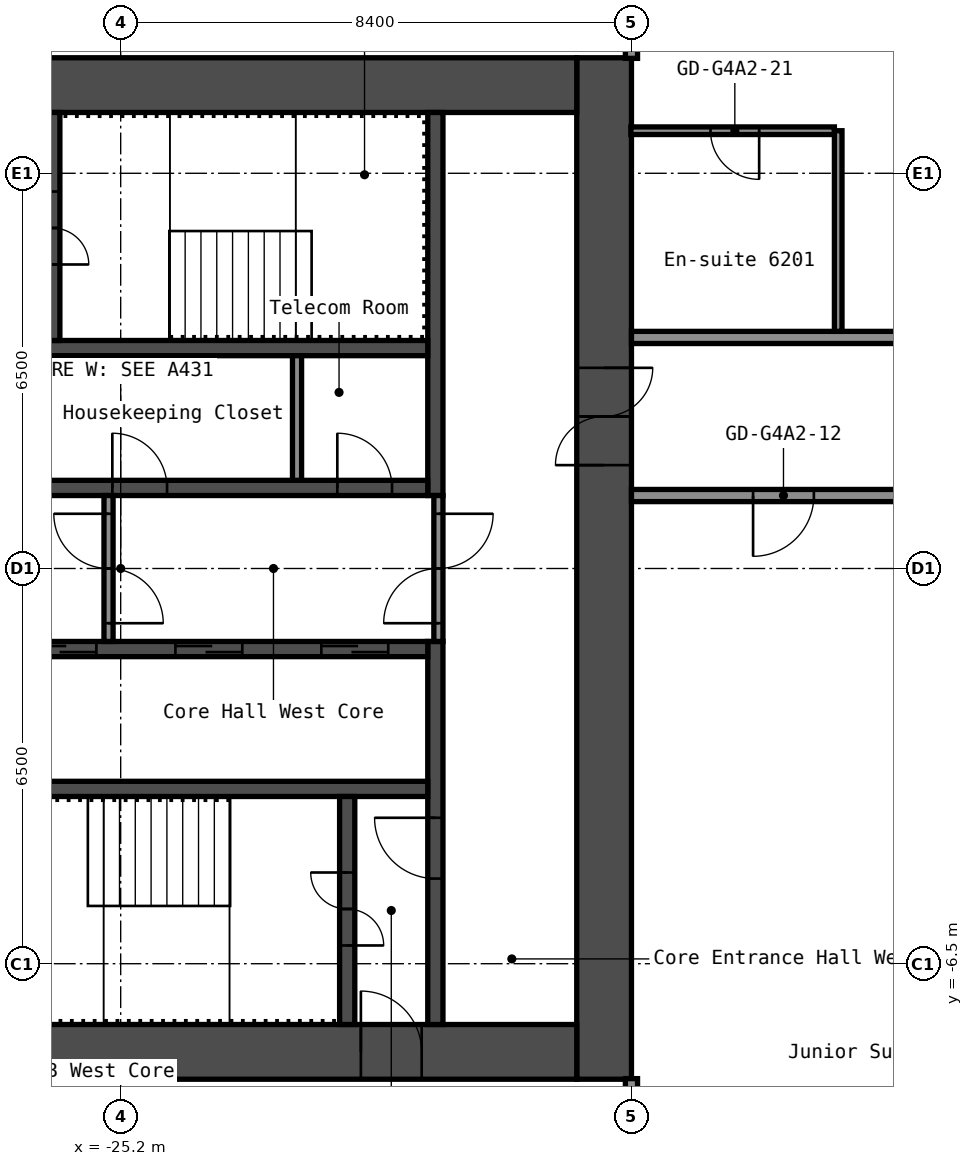
"""IFC4 building model, lengths in metres.
Left out: names, types, materials, properties, quantities, classifications, styles, units other than length and angle.
Written with IfcOpenShell. Run it as: python <this file> out.ifc"""

import sys

from ifc_helpers import new_model, si_unit, direction, frame, frame_2d, origin, place, context, subcontext, project, spatial, rectangle, extrude, element, fill, save


model = new_model("IFC4")
c1 = context("Model", 3, precision=1e-05, world=origin(), true_north=direction((0.0, 1.0)))
c2 = subcontext(c1, "Body", "Model", "MODEL_VIEW")
j1 = project(units=[si_unit("LENGTHUNIT", "METRE"), si_unit("PLANEANGLEUNIT", "RADIAN")], contexts=[c1])
p1 = place(None, origin())
s1 = spatial("IfcSite", under=j1, at=p1, CompositionType="ELEMENT")
p2 = place(p1, origin())
s2 = spatial("IfcBuilding", under=s1, at=p2, CompositionType="ELEMENT")
p3 = place(p2, frame((0.0, 0.0, 218.6)))
s3 = spatial("IfcBuildingStorey", under=s2, at=p3, CompositionType="ELEMENT", Elevation=218.6)
p4 = place(p3, frame((-17.25, -8.4, 0.0), z_axis=(0.0, 0.0, 1.0), x_axis=(0.0, 1.0, 0.0)))
e1 = element("IfcWall", 1, at=p4, inside=s3, PredefinedType="SHEAR", context=c2, shape_type="SweptSolid", body=[
    extrude(rectangle(XDim=16.8, YDim=0.9, at=frame_2d((8.4, 0.0))), origin(), (0.0, 0.0, 1.0), 2.75),
])
p5 = place(p4, frame((10.1, 0.0, 0.0)))
e2 = element("IfcOpeningElement", 2, at=p5, cuts=e1, PredefinedType="OPENING", context=c2, shape_type="SweptSolid", body=[
    extrude(rectangle(XDim=1.6, YDim=2.1, at=frame_2d((0.8, 1.05))), frame((0.0, 0.46, 0.0), z_axis=(0.0, -1.0, 0.0), x_axis=(1.0, 0.0, 0.0)), (0.0, 0.0, 1.0), 0.92),
])
p6 = place(p3, frame((-32.7, 7.95, 0.0), z_axis=(0.0, 0.0, 1.0), x_axis=(1.0, 0.0, 0.0)))
e3 = element("IfcWall", 3, at=p6, inside=s3, PredefinedType="SHEAR", context=c2, shape_type="SweptSolid", body=[
    extrude(rectangle(XDim=15.0, YDim=0.9, at=frame_2d((7.5, 0.0))), origin(), (0.0, 0.0, 1.0), 2.75),
])
p7 = place(p6, frame((3.4, 0.0, 0.0)))
e4 = element("IfcOpeningElement", 4, at=p7, cuts=e3, PredefinedType="OPENING", context=c2, shape_type="SweptSolid", body=[
    extrude(rectangle(XDim=1.2, YDim=2.1, at=frame_2d((0.6, 1.05))), frame((0.0, 0.46, 0.0), z_axis=(0.0, -1.0, 0.0), x_axis=(1.0, 0.0, 0.0)), (0.0, 0.0, 1.0), 0.92),
])
p8 = place(p6, frame((0.75, 0.0, 0.0)))
e5 = element("IfcOpeningElement", 5, at=p8, cuts=e3, PredefinedType="OPENING", context=c2, shape_type="SweptSolid", body=[
    extrude(rectangle(XDim=0.9, YDim=2.1, at=frame_2d((0.45, 1.05))), frame((0.0, 0.46, 0.0), z_axis=(0.0, -1.0, 0.0), x_axis=(1.0, 0.0, 0.0)), (0.0, 0.0, 1.0), 0.92),
])
p9 = place(p3, frame((-32.7, -7.95, 0.0), z_axis=(0.0, 0.0, 1.0), x_axis=(1.0, 0.0, 0.0)))
e6 = element("IfcWall", 6, at=p9, inside=s3, PredefinedType="SHEAR", context=c2, shape_type="SweptSolid", body=[
    extrude(rectangle(XDim=15.0, YDim=0.9, at=frame_2d((7.5, 0.0))), origin(), (0.0, 0.0, 1.0), 2.75),
])
p10 = place(p9, frame((11.45, 0.0, 0.0)))
e7 = element("IfcOpeningElement", 7, at=p10, cuts=e6, PredefinedType="OPENING", context=c2, shape_type="SweptSolid", body=[
    extrude(rectangle(XDim=1.0, YDim=2.1, at=frame_2d((0.5, 1.05))), frame((0.0, 0.46, 0.0), z_axis=(0.0, -1.0, 0.0), x_axis=(1.0, 0.0, 0.0)), (0.0, 0.0, 1.0), 0.92),
])
p11 = place(p3, frame((-20.025, 1.2, 0.0), z_axis=(0.0, 0.0, 1.0), x_axis=(0.0, 1.0, 0.0)))
e8 = element("IfcWall", 8, at=p11, inside=s3, PredefinedType="SHEAR", context=c2, shape_type="SweptSolid", body=[
    extrude(rectangle(XDim=6.3, YDim=0.25, at=frame_2d((3.15, 0.0))), origin(), (0.0, 0.0, 1.0), 2.75),
])
p12 = place(p3, frame((-20.025, -7.5, 0.0), z_axis=(0.0, 0.0, 1.0), x_axis=(0.0, 1.0, 0.0)))
e9 = element("IfcWall", 9, at=p12, inside=s3, PredefinedType="SHEAR", context=c2, shape_type="SweptSolid", body=[
    extrude(rectangle(XDim=6.3, YDim=0.25, at=frame_2d((3.15, 0.0))), origin(), (0.0, 0.0, 1.0), 2.75),
])
p13 = place(p12, frame((2.4, 0.0, 0.0)))
e10 = element("IfcOpeningElement", 10, at=p13, cuts=e9, PredefinedType="OPENING", context=c2, shape_type="SweptSolid", body=[
    extrude(rectangle(XDim=1.0, YDim=2.1, at=frame_2d((0.5, 1.05))), frame((0.0, 0.135, 0.0), z_axis=(0.0, -1.0, 0.0), x_axis=(1.0, 0.0, 0.0)), (0.0, 0.0, 1.0), 0.27),
])
p14 = place(p3, frame((-27.65, 1.325, 0.0), z_axis=(0.0, 0.0, 1.0), x_axis=(1.0, 0.0, 0.0)))
e11 = element("IfcWall", 11, at=p14, inside=s3, PredefinedType="SHEAR", context=c2, shape_type="SweptSolid", body=[
    extrude(rectangle(XDim=7.5, YDim=0.25, at=frame_2d((3.75, 0.0))), origin(), (0.0, 0.0, 1.0), 2.75),
])
p15 = place(p14, frame((6.012, 0.0, 0.0)))
e12 = element("IfcOpeningElement", 12, at=p15, cuts=e11, PredefinedType="OPENING", context=c2, shape_type="SweptSolid", body=[
    extrude(rectangle(XDim=0.9, YDim=2.1, at=frame_2d((0.45, 1.05))), frame((0.0, 0.135, 0.0), z_axis=(0.0, -1.0, 0.0), x_axis=(1.0, 0.0, 0.0)), (0.0, 0.0, 1.0), 0.27),
])
p16 = place(p14, frame((2.312, 0.0, 0.0)))
e13 = element("IfcOpeningElement", 13, at=p16, cuts=e11, PredefinedType="OPENING", context=c2, shape_type="SweptSolid", body=[
    extrude(rectangle(XDim=0.9, YDim=2.1, at=frame_2d((0.45, 1.05))), frame((0.0, 0.135, 0.0), z_axis=(0.0, -1.0, 0.0), x_axis=(1.0, 0.0, 0.0)), (0.0, 0.0, 1.0), 0.27),
])
p17 = place(p3, frame((-27.65, 3.625, 0.0), z_axis=(0.0, 0.0, 1.0), x_axis=(1.0, 0.0, 0.0)))
e14 = element("IfcWall", 14, at=p17, inside=s3, PredefinedType="SHEAR", context=c2, shape_type="SweptSolid", body=[
    extrude(rectangle(XDim=7.5, YDim=0.25, at=frame_2d((3.75, 0.0))), origin(), (0.0, 0.0, 1.0), 2.75),
])
p18 = place(p3, frame((-26.325, 3.75, 0.0), z_axis=(0.0, 0.0, 1.0), x_axis=(0.0, 1.0, 0.0)))
e15 = element("IfcWall", 15, at=p18, inside=s3, PredefinedType="SHEAR", context=c2, shape_type="SweptSolid", body=[
    extrude(rectangle(XDim=3.75, YDim=0.25, at=frame_2d((1.875, 0.0))), origin(), (0.0, 0.0, 1.0), 2.75),
])
p19 = place(p18, frame((1.25, 0.0, 0.0)))
e16 = element("IfcOpeningElement", 16, at=p19, cuts=e15, PredefinedType="OPENING", context=c2, shape_type="SweptSolid", body=[
    extrude(rectangle(XDim=1.2, YDim=2.1, at=frame_2d((0.6, 1.05))), frame((0.0, 0.135, 0.0), z_axis=(0.0, -1.0, 0.0), x_axis=(1.0, 0.0, 0.0)), (0.0, 0.0, 1.0), 0.27),
])
p20 = place(p3, frame((-27.65, -1.325, 0.0), z_axis=(0.0, 0.0, 1.0), x_axis=(1.0, 0.0, 0.0)))
e17 = element("IfcWall", 17, at=p20, inside=s3, PredefinedType="SHEAR", context=c2, shape_type="SweptSolid", body=[
    extrude(rectangle(XDim=7.5, YDim=0.25, at=frame_2d((3.75, 0.0))), origin(), (0.0, 0.0, 1.0), 2.75),
])
p21 = place(p20, frame((5.75, 0.0, 0.0)))
e18 = element("IfcOpeningElement", 18, at=p21, cuts=e17, PredefinedType="OPENING", context=c2, shape_type="SweptSolid", body=[
    extrude(rectangle(XDim=1.1, YDim=2.1, at=frame_2d((0.55, 1.05))), frame((0.0, 0.135, 0.0), z_axis=(0.0, -1.0, 0.0), x_axis=(1.0, 0.0, 0.0)), (0.0, 0.0, 1.0), 0.27),
])
p22 = place(p20, frame((3.35, 0.0, 0.0)))
e19 = element("IfcOpeningElement", 19, at=p22, cuts=e17, PredefinedType="OPENING", context=c2, shape_type="SweptSolid", body=[
    extrude(rectangle(XDim=1.1, YDim=2.1, at=frame_2d((0.55, 1.05))), frame((0.0, 0.135, 0.0), z_axis=(0.0, -1.0, 0.0), x_axis=(1.0, 0.0, 0.0)), (0.0, 0.0, 1.0), 0.27),
])
p23 = place(p20, frame((0.95, 0.0, 0.0)))
e20 = element("IfcOpeningElement", 20, at=p23, cuts=e17, PredefinedType="OPENING", context=c2, shape_type="SweptSolid", body=[
    extrude(rectangle(XDim=1.1, YDim=2.1, at=frame_2d((0.55, 1.05))), frame((0.0, 0.135, 0.0), z_axis=(0.0, -1.0, 0.0), x_axis=(1.0, 0.0, 0.0)), (0.0, 0.0, 1.0), 0.27),
])
p24 = place(p3, frame((-27.65, -3.625, 0.0), z_axis=(0.0, 0.0, 1.0), x_axis=(1.0, 0.0, 0.0)))
e21 = element("IfcWall", 21, at=p24, inside=s3, PredefinedType="SHEAR", context=c2, shape_type="SweptSolid", body=[
    extrude(rectangle(XDim=7.5, YDim=0.25, at=frame_2d((3.75, 0.0))), origin(), (0.0, 0.0, 1.0), 2.75),
])
p25 = place(p3, frame((-21.475, -7.5, 0.0), z_axis=(0.0, 0.0, 1.0), x_axis=(0.0, 1.0, 0.0)))
e22 = element("IfcWall", 22, at=p25, inside=s3, PredefinedType="SHEAR", context=c2, shape_type="SweptSolid", body=[
    extrude(rectangle(XDim=3.75, YDim=0.25, at=frame_2d((1.875, 0.0))), origin(), (0.0, 0.0, 1.0), 2.75),
])
p26 = place(p25, frame((1.3, 0.0, 0.0)))
e23 = element("IfcOpeningElement", 23, at=p26, cuts=e22, PredefinedType="OPENING", context=c2, shape_type="SweptSolid", body=[
    extrude(rectangle(XDim=1.2, YDim=2.1, at=frame_2d((0.6, 1.05))), frame((0.0, 0.135, 0.0), z_axis=(0.0, -1.0, 0.0), x_axis=(1.0, 0.0, 0.0)), (0.0, 0.0, 1.0), 0.27),
])
p27 = place(p3, frame((-19.975, -1.2, 0.0), z_axis=(0.0, 0.0, 1.0), x_axis=(0.0, 1.0, 0.0)))
e24 = element("IfcWall", 24, at=p27, inside=s3, PredefinedType="PARTITIONING", context=c2, shape_type="SweptSolid", body=[
    extrude(rectangle(XDim=2.4, YDim=0.15, at=frame_2d((1.2, 0.0))), origin(), (0.0, 0.0, 1.0), 2.75),
])
p28 = place(p27, frame((0.3, 0.0, 0.0)))
e25 = element("IfcOpeningElement", 25, at=p28, cuts=e24, PredefinedType="OPENING", context=c2, shape_type="SweptSolid", body=[
    extrude(rectangle(XDim=1.8, YDim=2.1, at=frame_2d((0.9, 1.05))), frame((0.0, 0.085, 0.0), z_axis=(0.0, -1.0, 0.0), x_axis=(1.0, 0.0, 0.0)), (0.0, 0.0, 1.0), 0.17),
])
p29 = place(p3, frame((-25.4, -1.2, 0.0), z_axis=(0.0, 0.0, 1.0), x_axis=(0.0, 1.0, 0.0)))
e26 = element("IfcWall", 26, at=p29, inside=s3, PredefinedType="PARTITIONING", context=c2, shape_type="SweptSolid", body=[
    extrude(rectangle(XDim=2.4, YDim=0.15, at=frame_2d((1.2, 0.0))), origin(), (0.0, 0.0, 1.0), 2.75),
])
p30 = place(p29, frame((0.3, 0.0, 0.0)))
e27 = element("IfcOpeningElement", 27, at=p30, cuts=e26, PredefinedType="OPENING", context=c2, shape_type="SweptSolid", body=[
    extrude(rectangle(XDim=1.8, YDim=2.1, at=frame_2d((0.9, 1.05))), frame((0.0, 0.085, 0.0), z_axis=(0.0, -1.0, 0.0), x_axis=(1.0, 0.0, 0.0)), (0.0, 0.0, 1.0), 0.17),
])
p31 = place(p3, frame((-22.3, 1.45, 0.0), z_axis=(0.0, 0.0, 1.0), x_axis=(0.0, 1.0, 0.0)))
e28 = element("IfcWall", 28, at=p31, inside=s3, PredefinedType="PARTITIONING", context=c2, shape_type="SweptSolid", body=[
    extrude(rectangle(XDim=2.05, YDim=0.15, at=frame_2d((1.025, 0.0))), origin(), (0.0, 0.0, 1.0), 2.75),
])
p32 = place(p3, frame((-16.8, 1.2, 0.0), z_axis=(0.0, 0.0, 1.0), x_axis=(1.0, 0.0, 0.0)))
e29 = element("IfcWall", 29, at=p32, inside=s3, PredefinedType="PARTITIONING", context=c2, shape_type="SweptSolid", body=[
    extrude(rectangle(XDim=33.6, YDim=0.2, at=frame_2d((16.8, 0.0))), origin(), (0.0, 0.0, 1.0), 2.75),
])
p33 = place(p32, frame((2.0, 0.0, 0.0)))
e30 = element("IfcOpeningElement", 30, at=p33, cuts=e29, PredefinedType="OPENING", context=c2, shape_type="SweptSolid", body=[
    extrude(rectangle(XDim=1.0, YDim=2.1, at=frame_2d((0.5, 1.05))), frame((0.0, 0.11, 0.0), z_axis=(0.0, -1.0, 0.0), x_axis=(1.0, 0.0, 0.0)), (0.0, 0.0, 1.0), 0.22),
])
p34 = place(p32, frame((12.1, 0.0, 0.0)))
e31 = element("IfcOpeningElement", 31, at=p34, cuts=e29, PredefinedType="OPENING", context=c2, shape_type="SweptSolid", body=[
    extrude(rectangle(XDim=1.0, YDim=2.1, at=frame_2d((0.5, 1.05))), frame((0.0, 0.11, 0.0), z_axis=(0.0, -1.0, 0.0), x_axis=(1.0, 0.0, 0.0)), (0.0, 0.0, 1.0), 0.22),
])
p35 = place(p32, frame((18.8, 0.0, 0.0)))
e32 = element("IfcOpeningElement", 32, at=p35, cuts=e29, PredefinedType="OPENING", context=c2, shape_type="SweptSolid", body=[
    extrude(rectangle(XDim=1.0, YDim=2.1, at=frame_2d((0.5, 1.05))), frame((0.0, 0.11, 0.0), z_axis=(0.0, -1.0, 0.0), x_axis=(1.0, 0.0, 0.0)), (0.0, 0.0, 1.0), 0.22),
])
p36 = place(p32, frame((27.2, 0.0, 0.0)))
e33 = element("IfcOpeningElement", 33, at=p36, cuts=e29, PredefinedType="OPENING", context=c2, shape_type="SweptSolid", body=[
    extrude(rectangle(XDim=1.0, YDim=2.1, at=frame_2d((0.5, 1.05))), frame((0.0, 0.11, 0.0), z_axis=(0.0, -1.0, 0.0), x_axis=(1.0, 0.0, 0.0)), (0.0, 0.0, 1.0), 0.22),
])
p37 = place(p3, frame((-16.8, 3.8, 0.0), z_axis=(0.0, 0.0, 1.0), x_axis=(1.0, 0.0, 0.0)))
e34 = element("IfcWall", 34, at=p37, inside=s3, PredefinedType="PARTITIONING", context=c2, shape_type="SweptSolid", body=[
    extrude(rectangle(XDim=33.6, YDim=0.2, at=frame_2d((16.8, 0.0))), origin(), (0.0, 0.0, 1.0), 2.75),
])
p38 = place(p37, frame((5.4, 0.0, 0.0)))
e35 = element("IfcOpeningElement", 35, at=p38, cuts=e34, PredefinedType="OPENING", context=c2, shape_type="SweptSolid", body=[
    extrude(rectangle(XDim=1.0, YDim=2.1, at=frame_2d((0.5, 1.05))), frame((0.0, 0.11, 0.0), z_axis=(0.0, -1.0, 0.0), x_axis=(1.0, 0.0, 0.0)), (0.0, 0.0, 1.0), 0.22),
])
p39 = place(p37, frame((12.1, 0.0, 0.0)))
e36 = element("IfcOpeningElement", 36, at=p39, cuts=e34, PredefinedType="OPENING", context=c2, shape_type="SweptSolid", body=[
    extrude(rectangle(XDim=1.0, YDim=2.1, at=frame_2d((0.5, 1.05))), frame((0.0, 0.11, 0.0), z_axis=(0.0, -1.0, 0.0), x_axis=(1.0, 0.0, 0.0)), (0.0, 0.0, 1.0), 0.22),
])
p40 = place(p37, frame((18.87, 0.0, 0.0)))
e37 = element("IfcOpeningElement", 37, at=p40, cuts=e34, PredefinedType="OPENING", context=c2, shape_type="SweptSolid", body=[
    extrude(rectangle(XDim=0.9, YDim=2.1, at=frame_2d((0.45, 1.05))), frame((0.0, 0.11, 0.0), z_axis=(0.0, -1.0, 0.0), x_axis=(1.0, 0.0, 0.0)), (0.0, 0.0, 1.0), 0.22),
])
p41 = place(p37, frame((23.07, 0.0, 0.0)))
e38 = element("IfcOpeningElement", 38, at=p41, cuts=e34, PredefinedType="OPENING", context=c2, shape_type="SweptSolid", body=[
    extrude(rectangle(XDim=0.9, YDim=2.1, at=frame_2d((0.45, 1.05))), frame((0.0, 0.11, 0.0), z_axis=(0.0, -1.0, 0.0), x_axis=(1.0, 0.0, 0.0)), (0.0, 0.0, 1.0), 0.22),
])
p42 = place(p37, frame((30.6, 0.0, 0.0)))
e39 = element("IfcOpeningElement", 39, at=p42, cuts=e34, PredefinedType="OPENING", context=c2, shape_type="SweptSolid", body=[
    extrude(rectangle(XDim=1.0, YDim=2.1, at=frame_2d((0.5, 1.05))), frame((0.0, 0.11, 0.0), z_axis=(0.0, -1.0, 0.0), x_axis=(1.0, 0.0, 0.0)), (0.0, 0.0, 1.0), 0.22),
])
p43 = place(p3, frame((-16.81, 7.2, 0.0), z_axis=(0.0, 0.0, 1.0), x_axis=(1.0, 0.0, 0.0)))
e40 = element("IfcWall", 40, at=p43, inside=s3, PredefinedType="PARTITIONING", context=c2, shape_type="SweptSolid", body=[
    extrude(rectangle(XDim=3.348, YDim=0.125, at=frame_2d((1.674, 0.0))), origin(), (0.0, 0.0, 1.0), 2.75),
])
p44 = place(p43, frame((1.31, 0.0, 0.0)))
e41 = element("IfcOpeningElement", 41, at=p44, cuts=e40, PredefinedType="OPENING", context=c2, shape_type="SweptSolid", body=[
    extrude(rectangle(XDim=0.8, YDim=2.1, at=frame_2d((0.4, 1.05))), frame((0.0, 0.073, 0.0), z_axis=(0.0, -1.0, 0.0), x_axis=(1.0, 0.0, 0.0)), (0.0, 0.0, 1.0), 0.145),
])
p45 = place(p3, frame((-16.8, -15.55, 0.0), z_axis=(0.0, 0.0, 1.0), x_axis=(0.0, 1.0, 0.0)))
e42 = element("IfcWall", 42, at=p45, inside=s3, PredefinedType="PARTITIONING", context=c2, shape_type="SweptSolid", body=[
    extrude(rectangle(XDim=7.16, YDim=0.2, at=frame_2d((3.58, 0.0))), origin(), (0.0, 0.0, 1.0), 2.75),
])
p46 = place(p3, frame((-16.8, 8.39, 0.0), z_axis=(0.0, 0.0, 1.0), x_axis=(0.0, 1.0, 0.0)))
e43 = element("IfcWall", 43, at=p46, inside=s3, PredefinedType="PARTITIONING", context=c2, shape_type="SweptSolid", body=[
    extrude(rectangle(XDim=12.16, YDim=0.2, at=frame_2d((6.08, 0.0))), origin(), (0.0, 0.0, 1.0), 2.75),
])
p47 = place(p3, frame((-13.4, 3.9, 0.0), z_axis=(0.0, 0.0, 1.0), x_axis=(0.0, 1.0, 0.0)))
e44 = element("IfcWall", 44, at=p47, inside=s3, PredefinedType="PARTITIONING", context=c2, shape_type="SweptSolid", body=[
    extrude(rectangle(XDim=3.3, YDim=0.125, at=frame_2d((1.65, 0.0))), origin(), (0.0, 0.0, 1.0), 2.75),
])
p48 = place(p5, origin())
e45 = element("IfcDoor", 45, at=p48, inside=s3, OperationType="DOUBLE_DOOR_SINGLE_SWING", PredefinedType="DOOR", context=c2, shape_type="SweptSolid", body=[
    extrude(rectangle(XDim=1.6, YDim=2.1, at=frame_2d((0.8, 1.05))), frame((0.0, 0.025, 0.0), z_axis=(0.0, -1.0, 0.0), x_axis=(1.0, 0.0, 0.0)), (0.0, 0.0, 1.0), 0.05),
])
fill(e2, e45)
p49 = place(p10, origin())
e46 = element("IfcDoor", 46, at=p49, inside=s3, OperationType="SINGLE_SWING_RIGHT", PredefinedType="DOOR", context=c2, shape_type="SweptSolid", body=[
    extrude(rectangle(XDim=1.0, YDim=2.1, at=frame_2d((0.5, 1.05))), frame((0.0, 0.025, 0.0), z_axis=(0.0, -1.0, 0.0), x_axis=(1.0, 0.0, 0.0)), (0.0, 0.0, 1.0), 0.05),
])
fill(e7, e46)
p50 = place(p19, origin())
e47 = element("IfcDoor", 47, at=p50, inside=s3, OperationType="DOUBLE_DOOR_SINGLE_SWING", PredefinedType="DOOR", context=c2, shape_type="SweptSolid", body=[
    extrude(rectangle(XDim=1.2, YDim=2.1, at=frame_2d((0.6, 1.05))), frame((0.0, 0.025, 0.0), z_axis=(0.0, -1.0, 0.0), x_axis=(1.0, 0.0, 0.0)), (0.0, 0.0, 1.0), 0.05),
])
fill(e16, e47)
p51 = place(p26, origin())
e48 = element("IfcDoor", 48, at=p51, inside=s3, OperationType="DOUBLE_DOOR_SINGLE_SWING", PredefinedType="DOOR", context=c2, shape_type="SweptSolid", body=[
    extrude(rectangle(XDim=1.2, YDim=2.1, at=frame_2d((0.6, 1.05))), frame((0.0, 0.025, 0.0), z_axis=(0.0, -1.0, 0.0), x_axis=(1.0, 0.0, 0.0)), (0.0, 0.0, 1.0), 0.05),
])
fill(e23, e48)
p52 = place(p13, origin())
e49 = element("IfcDoor", 49, at=p52, inside=s3, OperationType="SINGLE_SWING_LEFT", PredefinedType="DOOR", context=c2, shape_type="SweptSolid", body=[
    extrude(rectangle(XDim=1.0, YDim=2.1, at=frame_2d((0.5, 1.05))), frame((0.0, 0.025, 0.0), z_axis=(0.0, -1.0, 0.0), x_axis=(1.0, 0.0, 0.0)), (0.0, 0.0, 1.0), 0.05),
])
fill(e10, e49)
p53 = place(p28, origin())
e50 = element("IfcDoor", 50, at=p53, inside=s3, OperationType="DOUBLE_DOOR_SINGLE_SWING", PredefinedType="DOOR", context=c2, shape_type="SweptSolid", body=[
    extrude(rectangle(XDim=1.8, YDim=2.1, at=frame_2d((0.9, 1.05))), frame((0.0, 0.025, 0.0), z_axis=(0.0, -1.0, 0.0), x_axis=(1.0, 0.0, 0.0)), (0.0, 0.0, 1.0), 0.05),
])
fill(e25, e50)
p54 = place(p30, origin())
e51 = element("IfcDoor", 51, at=p54, inside=s3, OperationType="DOUBLE_DOOR_SINGLE_SWING", PredefinedType="DOOR", context=c2, shape_type="SweptSolid", body=[
    extrude(rectangle(XDim=1.8, YDim=2.1, at=frame_2d((0.9, 1.05))), frame((0.0, 0.025, 0.0), z_axis=(0.0, -1.0, 0.0), x_axis=(1.0, 0.0, 0.0)), (0.0, 0.0, 1.0), 0.05),
])
fill(e27, e51)
p55 = place(p15, origin())
e52 = element("IfcDoor", 52, at=p55, inside=s3, OperationType="SINGLE_SWING_RIGHT", PredefinedType="DOOR", context=c2, shape_type="SweptSolid", body=[
    extrude(rectangle(XDim=0.9, YDim=2.1, at=frame_2d((0.45, 1.05))), frame((0.0, 0.025, 0.0), z_axis=(0.0, -1.0, 0.0), x_axis=(1.0, 0.0, 0.0)), (0.0, 0.0, 1.0), 0.05),
])
fill(e12, e52)
p56 = place(p16, origin())
e53 = element("IfcDoor", 53, at=p56, inside=s3, OperationType="SINGLE_SWING_RIGHT", PredefinedType="DOOR", context=c2, shape_type="SweptSolid", body=[
    extrude(rectangle(XDim=0.9, YDim=2.1, at=frame_2d((0.45, 1.05))), frame((0.0, 0.025, 0.0), z_axis=(0.0, -1.0, 0.0), x_axis=(1.0, 0.0, 0.0)), (0.0, 0.0, 1.0), 0.05),
])
fill(e13, e53)
p57 = place(p21, origin())
e54 = element("IfcDoor", 54, at=p57, inside=s3, OperationType="DOUBLE_DOOR_SLIDING", PredefinedType="DOOR", context=c2, shape_type="SweptSolid", body=[
    extrude(rectangle(XDim=1.1, YDim=2.1, at=frame_2d((0.55, 1.05))), frame((0.0, 0.025, 0.0), z_axis=(0.0, -1.0, 0.0), x_axis=(1.0, 0.0, 0.0)), (0.0, 0.0, 1.0), 0.05),
])
fill(e18, e54)
p58 = place(p22, origin())
e55 = element("IfcDoor", 55, at=p58, inside=s3, OperationType="DOUBLE_DOOR_SLIDING", PredefinedType="DOOR", context=c2, shape_type="SweptSolid", body=[
    extrude(rectangle(XDim=1.1, YDim=2.1, at=frame_2d((0.55, 1.05))), frame((0.0, 0.025, 0.0), z_axis=(0.0, -1.0, 0.0), x_axis=(1.0, 0.0, 0.0)), (0.0, 0.0, 1.0), 0.05),
])
fill(e19, e55)
p59 = place(p23, origin())
e56 = element("IfcDoor", 56, at=p59, inside=s3, OperationType="DOUBLE_DOOR_SLIDING", PredefinedType="DOOR", context=c2, shape_type="SweptSolid", body=[
    extrude(rectangle(XDim=1.1, YDim=2.1, at=frame_2d((0.55, 1.05))), frame((0.0, 0.025, 0.0), z_axis=(0.0, -1.0, 0.0), x_axis=(1.0, 0.0, 0.0)), (0.0, 0.0, 1.0), 0.05),
])
fill(e20, e56)
p60 = place(p33, origin())
e57 = element("IfcDoor", 57, at=p60, inside=s3, OperationType="SINGLE_SWING_LEFT", PredefinedType="DOOR", context=c2, shape_type="SweptSolid", body=[
    extrude(rectangle(XDim=1.0, YDim=2.1, at=frame_2d((0.5, 1.05))), frame((0.0, 0.025, 0.0), z_axis=(0.0, -1.0, 0.0), x_axis=(1.0, 0.0, 0.0)), (0.0, 0.0, 1.0), 0.05),
])
fill(e30, e57)
p61 = place(p44, origin())
e58 = element("IfcDoor", 58, at=p61, inside=s3, OperationType="SINGLE_SWING_RIGHT", PredefinedType="DOOR", context=c2, shape_type="SweptSolid", body=[
    extrude(rectangle(XDim=0.8, YDim=2.1, at=frame_2d((0.4, 1.05))), frame((0.0, 0.025, 0.0), z_axis=(0.0, -1.0, 0.0), x_axis=(1.0, 0.0, 0.0)), (0.0, 0.0, 1.0), 0.05),
])
fill(e41, e58)
save(model, sys.argv[1])
